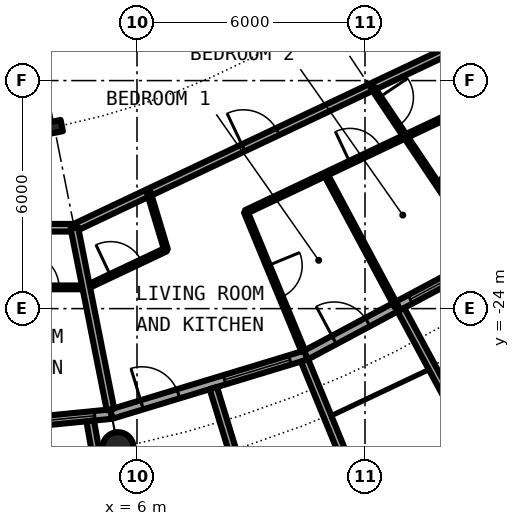
"""IFC4 building model, lengths in metres.
Left out: names, types, materials, properties, quantities, classifications, styles, units other than length and angle.
Written with IfcOpenShell. Run it as: python <this file> out.ifc"""

import sys

from ifc_helpers import new_model, si_unit, direction, frame, frame_2d, origin, origin_2d, place, context, subcontext, project, spatial, rectangle, hollow_circle, i_section, extrude, element, fill, save


model = new_model("IFC4")
c1 = context("Model", 3, precision=1e-05, world=origin(), true_north=direction((0.0, 1.0)))
c2 = subcontext(c1, "Body", "Model", "MODEL_VIEW")
j1 = project(units=[si_unit("LENGTHUNIT", "METRE"), si_unit("PLANEANGLEUNIT", "RADIAN")], contexts=[c1])
p1 = place(None, origin())
s1 = spatial("IfcSite", under=j1, at=p1, CompositionType="ELEMENT")
p2 = place(p1, origin())
s2 = spatial("IfcBuilding", under=s1, at=p2, CompositionType="ELEMENT")
p3 = place(p2, frame((0.0, 0.0, 212.7)))
s3 = spatial("IfcBuildingStorey", under=s2, at=p3, CompositionType="ELEMENT", Elevation=212.7)
p4 = place(p3, frame((5.501, -27.658, 0.0), z_axis=(0.0, 0.0, 1.0), x_axis=(1.0, 0.0, 0.0)))
e1 = element("IfcColumn", 1, at=p4, inside=s3, PredefinedType="COLUMN", context=c2, shape_type="SweptSolid", body=[
    extrude(hollow_circle(Radius=0.406, WallThickness=0.03, at=origin_2d()), origin(), (0.0, 0.0, 1.0), 3.05),
])
p5 = place(p3, frame((3.824, -19.223, 0.0), z_axis=(0.0, 0.0, 1.0), x_axis=(0.195090322016, -0.980785280403, 0.0)))
e2 = element("IfcColumn", 2, at=p5, inside=s3, PredefinedType="COLUMN", context=c2, shape_type="SweptSolid", body=[
    extrude(i_section(OverallWidth=0.3, OverallDepth=0.4, WebThickness=0.013, FlangeThickness=0.024, FilletRadius=0.027, at=origin_2d()), origin(), (0.0, 0.0, 1.0), 3.05),
])
p6 = place(p3, frame((0.0, -27.3, 0.0), z_axis=(0.0, 0.0, 1.0), x_axis=(0.995173996315, 0.098126026407, 0.0)))
e3 = element("IfcWall", 3, at=p6, inside=s3, PredefinedType="SOLIDWALL", context=c2, shape_type="SweptSolid", body=[
    extrude(rectangle(XDim=5.352, YDim=0.25, at=frame_2d((2.676, 0.0))), origin(), (0.0, 0.0, 1.0), 2.7),
])
p7 = place(p6, frame((0.841, 0.0, 0.0)))
e4 = element("IfcOpeningElement", 4, at=p7, cuts=e3, PredefinedType="OPENING", context=c2, shape_type="SweptSolid", body=[
    extrude(rectangle(XDim=1.0, YDim=2.2, at=frame_2d((0.5, 1.1))), frame((0.0, 0.135, 0.0), z_axis=(0.0, -1.0, 0.0), x_axis=(1.0, 0.0, 0.0)), (0.0, 0.0, 1.0), 0.27),
])
p8 = place(p6, frame((3.111, 0.0, 0.3)))
e5 = element("IfcOpeningElement", 5, at=p8, cuts=e3, PredefinedType="OPENING", context=c2, shape_type="SweptSolid", body=[
    extrude(rectangle(XDim=1.8, YDim=2.1, at=frame_2d((0.9, 1.05))), frame((0.0, 0.135, 0.0), z_axis=(0.0, -1.0, 0.0), x_axis=(1.0, 0.0, 0.0)), (0.0, 0.0, 1.0), 0.27),
])
p9 = place(p3, frame((4.769, -26.956, -0.03), z_axis=(0.0, 0.0, 1.0), x_axis=(0.174056778901, -0.984735618183, 0.0)))
e6 = element("IfcWall", 6, at=p9, inside=s3, PredefinedType="SOLIDWALL", context=c2, shape_type="SweptSolid", body=[
    extrude(rectangle(XDim=2.925, YDim=0.2, at=frame_2d((1.462, 0.0))), origin(), (0.0, 0.0, 1.0), 2.73),
])
p10 = place(p3, frame((5.326, -26.775, 0.0), z_axis=(0.0, 0.0, 1.0), x_axis=(0.956965678721, 0.290201119486, 0.0)))
e7 = element("IfcWall", 7, at=p10, inside=s3, PredefinedType="SOLIDWALL", context=c2, shape_type="SweptSolid", body=[
    extrude(rectangle(XDim=5.351, YDim=0.25, at=frame_2d((2.676, 0.0))), origin(), (0.0, 0.0, 1.0), 2.7),
])
p11 = place(p10, frame((0.841, 0.0, 0.0)))
e8 = element("IfcOpeningElement", 8, at=p11, cuts=e7, PredefinedType="OPENING", context=c2, shape_type="SweptSolid", body=[
    extrude(rectangle(XDim=1.0, YDim=2.2, at=frame_2d((0.5, 1.1))), frame((0.0, 0.135, 0.0), z_axis=(0.0, -1.0, 0.0), x_axis=(1.0, 0.0, 0.0)), (0.0, 0.0, 1.0), 0.27),
])
p12 = place(p10, frame((3.111, 0.0, 0.3)))
e9 = element("IfcOpeningElement", 9, at=p12, cuts=e7, PredefinedType="OPENING", context=c2, shape_type="SweptSolid", body=[
    extrude(rectangle(XDim=1.8, YDim=2.1, at=frame_2d((0.9, 1.05))), frame((0.0, 0.135, 0.0), z_axis=(0.0, -1.0, 0.0), x_axis=(1.0, 0.0, 0.0)), (0.0, 0.0, 1.0), 0.27),
])
p13 = place(p3, frame((8.009, -26.092, -0.03), z_axis=(0.0, 0.0, 1.0), x_axis=(0.293406695073, -0.955987715029, 0.0)))
e10 = element("IfcWall", 10, at=p13, inside=s3, PredefinedType="SOLIDWALL", context=c2, shape_type="SweptSolid", body=[
    extrude(rectangle(XDim=3.006, YDim=0.2, at=frame_2d((1.503, 0.0))), origin(), (0.0, 0.0, 1.0), 2.73),
])
p14 = place(p3, frame((10.409, -25.364, -0.03), z_axis=(0.0, 0.0, 1.0), x_axis=(0.379509886562, -0.925187681501, 0.0)))
e11 = element("IfcWall", 11, at=p14, inside=s3, PredefinedType="SOLIDWALL", context=c2, shape_type="SweptSolid", body=[
    extrude(rectangle(XDim=2.883, YDim=0.2, at=frame_2d((1.441, 0.0))), origin(), (0.0, 0.0, 1.0), 2.73),
])
p15 = place(p3, frame((10.447, -25.222, 0.0), z_axis=(0.0, 0.0, 1.0), x_axis=(0.881915646801, 0.471407246368, 0.0)))
e12 = element("IfcWall", 12, at=p15, inside=s3, PredefinedType="SOLIDWALL", context=c2, shape_type="SweptSolid", body=[
    extrude(rectangle(XDim=5.352, YDim=0.25, at=frame_2d((2.676, 0.0))), origin(), (0.0, 0.0, 1.0), 2.7),
])
p16 = place(p15, frame((0.841, 0.0, 0.0)))
e13 = element("IfcOpeningElement", 13, at=p16, cuts=e12, PredefinedType="OPENING", context=c2, shape_type="SweptSolid", body=[
    extrude(rectangle(XDim=1.0, YDim=2.2, at=frame_2d((0.5, 1.1))), frame((0.0, 0.135, 0.0), z_axis=(0.0, -1.0, 0.0), x_axis=(1.0, 0.0, 0.0)), (0.0, 0.0, 1.0), 0.27),
])
p17 = place(p15, frame((3.111, 0.0, 0.3)))
e14 = element("IfcOpeningElement", 14, at=p17, cuts=e12, PredefinedType="OPENING", context=c2, shape_type="SweptSolid", body=[
    extrude(rectangle(XDim=1.8, YDim=2.1, at=frame_2d((0.9, 1.05))), frame((0.0, 0.135, 0.0), z_axis=(0.0, -1.0, 0.0), x_axis=(1.0, 0.0, 0.0)), (0.0, 0.0, 1.0), 0.27),
])
p18 = place(p3, frame((12.945, -24.029, -0.03), z_axis=(0.0, 0.0, 1.0), x_axis=(0.474424310775, -0.88029629861, 0.0)))
e15 = element("IfcWall", 15, at=p18, inside=s3, PredefinedType="SOLIDWALL", context=c2, shape_type="SweptSolid", body=[
    extrude(rectangle(XDim=3.006, YDim=0.2, at=frame_2d((1.503, 0.0))), origin(), (0.0, 0.0, 1.0), 2.73),
])
p19 = place(p3, frame((2.331, -23.441, 0.0), z_axis=(0.0, 0.0, 1.0), x_axis=(1.0, 0.0, 0.0)))
e16 = element("IfcWall", 16, at=p19, inside=s3, PredefinedType="PARTITIONING", context=c2, shape_type="SweptSolid", body=[
    extrude(rectangle(XDim=2.332, YDim=0.1, at=frame_2d((1.166, 0.0))), origin(), (0.0, 0.0, 1.0), 2.7),
])
p20 = place(p19, frame((0.716, 0.0, 0.0)))
e17 = element("IfcOpeningElement", 17, at=p20, cuts=e16, PredefinedType="OPENING", context=c2, shape_type="SweptSolid", body=[
    extrude(rectangle(XDim=0.9, YDim=2.3, at=frame_2d((0.45, 1.15))), frame((0.0, 0.06, 0.0), z_axis=(0.0, -1.0, 0.0), x_axis=(1.0, 0.0, 0.0)), (0.0, 0.0, 1.0), 0.12),
])
p21 = place(p3, frame((4.663, -23.441, 0.0), z_axis=(0.0, 0.0, 1.0), x_axis=(0.904028696625, 0.427471771791, 0.0)))
e18 = element("IfcWall", 18, at=p21, inside=s3, PredefinedType="PARTITIONING", context=c2, shape_type="SweptSolid", body=[
    extrude(rectangle(XDim=2.323, YDim=0.1, at=frame_2d((1.161, 0.0))), origin(), (0.0, 0.0, 1.0), 2.7),
])
p22 = place(p21, frame((0.711, 0.0, 0.0)))
e19 = element("IfcOpeningElement", 19, at=p22, cuts=e18, PredefinedType="OPENING", context=c2, shape_type="SweptSolid", body=[
    extrude(rectangle(XDim=0.9, YDim=2.3, at=frame_2d((0.45, 1.15))), frame((0.0, 0.06, 0.0), z_axis=(0.0, -1.0, 0.0), x_axis=(1.0, 0.0, 0.0)), (0.0, 0.0, 1.0), 0.12),
])
p23 = place(p3, frame((8.863, -21.455, 0.0), z_axis=(0.0, 0.0, 1.0), x_axis=(0.904027961542, 0.427473326361, 0.0)))
e20 = element("IfcWall", 20, at=p23, inside=s3, PredefinedType="PARTITIONING", context=c2, shape_type="SweptSolid", body=[
    extrude(rectangle(XDim=6.969, YDim=0.1, at=frame_2d((3.484, 0.0))), origin(), (0.0, 0.0, 1.0), 2.7),
])
p24 = place(p23, frame((3.034, 0.0, 0.0)))
e21 = element("IfcOpeningElement", 21, at=p24, cuts=e20, PredefinedType="OPENING", context=c2, shape_type="SweptSolid", body=[
    extrude(rectangle(XDim=0.9, YDim=2.3, at=frame_2d((0.45, 1.15))), frame((0.0, 0.06, 0.0), z_axis=(0.0, -1.0, 0.0), x_axis=(1.0, 0.0, 0.0)), (0.0, 0.0, 1.0), 0.12),
])
p25 = place(p3, frame((-4.351, -21.872, 0.0), z_axis=(0.0, 0.0, 1.0), x_axis=(1.0, 0.0, 0.0)))
e22 = element("IfcWall", 22, at=p25, inside=s3, PredefinedType="PARTITIONING", context=c2, shape_type="SweptSolid", body=[
    extrude(rectangle(XDim=8.702, YDim=0.2, at=frame_2d((4.351, 0.0))), origin(), (0.0, 0.0, 1.0), 2.7),
])
p26 = place(p25, frame((2.763, 0.0, 0.0)))
e23 = element("IfcOpeningElement", 23, at=p26, cuts=e22, PredefinedType="OPENING", context=c2, shape_type="SweptSolid", body=[
    extrude(rectangle(XDim=1.0, YDim=2.3, at=frame_2d((0.5, 1.15))), frame((0.0, 0.11, 0.0), z_axis=(0.0, -1.0, 0.0), x_axis=(1.0, 0.0, 0.0)), (0.0, 0.0, 1.0), 0.22),
])
p27 = place(p3, frame((4.352, -21.873, 0.0), z_axis=(0.0, 0.0, 1.0), x_axis=(0.903903349022, 0.427736759733, 0.0)))
e24 = element("IfcWall", 24, at=p27, inside=s3, PredefinedType="PARTITIONING", context=c2, shape_type="SweptSolid", body=[
    extrude(rectangle(XDim=10.838, YDim=0.2, at=frame_2d((5.419, 0.0))), origin(), (0.0, 0.0, 1.0), 2.7),
])
p28 = place(p27, frame((4.92, 0.0, 0.0)))
e25 = element("IfcOpeningElement", 25, at=p28, cuts=e24, PredefinedType="OPENING", context=c2, shape_type="SweptSolid", body=[
    extrude(rectangle(XDim=1.0, YDim=2.3, at=frame_2d((0.5, 1.15))), frame((0.0, 0.11, 0.0), z_axis=(0.0, -1.0, 0.0), x_axis=(1.0, 0.0, 0.0)), (0.0, 0.0, 1.0), 0.22),
])
p29 = place(p3, frame((-3.454, -17.36, 0.0), z_axis=(0.0, 0.0, 1.0), x_axis=(0.995189328429, 0.097970406658, 0.0)))
e26 = element("IfcWall", 26, at=p29, inside=s3, PredefinedType="PARTITIONING", context=c2, shape_type="SweptSolid", body=[
    extrude(rectangle(XDim=10.28, YDim=0.2, at=frame_2d((5.14, 0.0))), origin(), (0.0, 0.0, 1.0), 2.7),
])
p30 = place(p29, frame((4.639, 0.0, 0.0)))
e27 = element("IfcOpeningElement", 27, at=p30, cuts=e26, PredefinedType="OPENING", context=c2, shape_type="SweptSolid", body=[
    extrude(rectangle(XDim=1.0, YDim=2.3, at=frame_2d((0.5, 1.15))), frame((0.0, 0.11, 0.0), z_axis=(0.0, -1.0, 0.0), x_axis=(1.0, 0.0, 0.0)), (0.0, 0.0, 1.0), 0.22),
])
p31 = place(p3, frame((4.351, -21.872, 0.0), z_axis=(0.0, 0.0, 1.0), x_axis=(0.195075825861, -0.980788163756, 0.0)))
e28 = element("IfcWall", 28, at=p31, inside=s3, PredefinedType="PARTITIONING", context=c2, shape_type="SweptSolid", body=[
    extrude(rectangle(XDim=4.875, YDim=0.2, at=frame_2d((2.438, 0.0))), origin(), (0.0, 0.0, 1.0), 2.7),
])
p32 = place(p3, frame((6.31, -20.945, 0.0), z_axis=(0.0, 0.0, 1.0), x_axis=(0.288517752304, -0.957474546192, 0.0)))
e29 = element("IfcWall", 29, at=p32, inside=s3, PredefinedType="PARTITIONING", context=c2, shape_type="SweptSolid", body=[
    extrude(rectangle(XDim=1.57, YDim=0.1, at=frame_2d((0.785, 0.0))), origin(), (0.0, 0.0, 1.0), 2.7),
])
p33 = place(p3, frame((8.862, -21.454, 0.0), z_axis=(0.0, 0.0, 1.0), x_axis=(0.381852842178, -0.924223136975, 0.0)))
e30 = element("IfcWall", 30, at=p33, inside=s3, PredefinedType="PARTITIONING", context=c2, shape_type="SweptSolid", body=[
    extrude(rectangle(XDim=3.962, YDim=0.1, at=frame_2d((1.981, 0.0))), origin(), (0.0, 0.0, 1.0), 2.7),
])
p34 = place(p33, frame((1.531, 0.0, 0.0)))
e31 = element("IfcOpeningElement", 31, at=p34, cuts=e30, PredefinedType="OPENING", context=c2, shape_type="SweptSolid", body=[
    extrude(rectangle(XDim=0.9, YDim=2.3, at=frame_2d((0.45, 1.15))), frame((0.0, 0.06, 0.0), z_axis=(0.0, -1.0, 0.0), x_axis=(1.0, 0.0, 0.0)), (0.0, 0.0, 1.0), 0.12),
])
p35 = place(p3, frame((10.962, -20.461, 0.0), z_axis=(0.0, 0.0, 1.0), x_axis=(0.472173540979, -0.881505613822, 0.0)))
e32 = element("IfcWall", 32, at=p35, inside=s3, PredefinedType="PARTITIONING", context=c2, shape_type="SweptSolid", body=[
    extrude(rectangle(XDim=3.963, YDim=0.1, at=frame_2d((1.981, 0.0))), origin(), (0.0, 0.0, 1.0), 2.7),
])
p36 = place(p3, frame((12.188, -18.165, 0.0), z_axis=(0.0, 0.0, 1.0), x_axis=(0.557206464517, -0.830373985564, 0.0)))
e33 = element("IfcWall", 33, at=p36, inside=s3, PredefinedType="PARTITIONING", context=c2, shape_type="SweptSolid", body=[
    extrude(rectangle(XDim=5.3, YDim=0.1, at=frame_2d((2.65, 0.0))), origin(), (0.0, 0.0, 1.0), 2.7),
])
p37 = place(p36, frame((0.334, 0.0, 0.0)))
e34 = element("IfcOpeningElement", 34, at=p37, cuts=e33, PredefinedType="OPENING", context=c2, shape_type="SweptSolid", body=[
    extrude(rectangle(XDim=0.9, YDim=2.3, at=frame_2d((0.45, 1.15))), frame((0.0, 0.06, 0.0), z_axis=(0.0, -1.0, 0.0), x_axis=(1.0, 0.0, 0.0)), (0.0, 0.0, 1.0), 0.12),
])
p38 = place(p36, frame((2.984, 0.0, 0.0)))
e35 = element("IfcOpeningElement", 35, at=p38, cuts=e33, PredefinedType="OPENING", context=c2, shape_type="SweptSolid", body=[
    extrude(rectangle(XDim=0.9, YDim=2.3, at=frame_2d((0.45, 1.15))), frame((0.0, 0.06, 0.0), z_axis=(0.0, -1.0, 0.0), x_axis=(1.0, 0.0, 0.0)), (0.0, 0.0, 1.0), 0.12),
])
p39 = place(p8, origin())
e36 = element("IfcWindow", 36, at=p39, inside=s3, PartitioningType="SINGLE_PANEL", PredefinedType="WINDOW", context=c2, shape_type="SweptSolid", body=[
    extrude(rectangle(XDim=1.8, YDim=2.1, at=frame_2d((0.9, 1.05))), frame((0.0, 0.03, 0.0), z_axis=(0.0, -1.0, 0.0), x_axis=(1.0, 0.0, 0.0)), (0.0, 0.0, 1.0), 0.06),
])
fill(e5, e36)
p40 = place(p11, origin())
e37 = element("IfcDoor", 37, at=p40, inside=s3, OperationType="SINGLE_SWING_LEFT", PredefinedType="DOOR", context=c2, shape_type="SweptSolid", body=[
    extrude(rectangle(XDim=1.0, YDim=2.2, at=frame_2d((0.5, 1.1))), frame((0.0, 0.025, 0.0), z_axis=(0.0, -1.0, 0.0), x_axis=(1.0, 0.0, 0.0)), (0.0, 0.0, 1.0), 0.05),
])
fill(e8, e37)
p41 = place(p12, origin())
e38 = element("IfcWindow", 38, at=p41, inside=s3, PartitioningType="SINGLE_PANEL", PredefinedType="WINDOW", context=c2, shape_type="SweptSolid", body=[
    extrude(rectangle(XDim=1.8, YDim=2.1, at=frame_2d((0.9, 1.05))), frame((0.0, 0.03, 0.0), z_axis=(0.0, -1.0, 0.0), x_axis=(1.0, 0.0, 0.0)), (0.0, 0.0, 1.0), 0.06),
])
fill(e9, e38)
p42 = place(p16, origin())
e39 = element("IfcDoor", 39, at=p42, inside=s3, OperationType="SINGLE_SWING_LEFT", PredefinedType="DOOR", context=c2, shape_type="SweptSolid", body=[
    extrude(rectangle(XDim=1.0, YDim=2.2, at=frame_2d((0.5, 1.1))), frame((0.0, 0.025, 0.0), z_axis=(0.0, -1.0, 0.0), x_axis=(1.0, 0.0, 0.0)), (0.0, 0.0, 1.0), 0.05),
])
fill(e13, e39)
p43 = place(p17, origin())
e40 = element("IfcWindow", 40, at=p43, inside=s3, PartitioningType="SINGLE_PANEL", PredefinedType="WINDOW", context=c2, shape_type="SweptSolid", body=[
    extrude(rectangle(XDim=1.8, YDim=2.1, at=frame_2d((0.9, 1.05))), frame((0.0, 0.03, 0.0), z_axis=(0.0, -1.0, 0.0), x_axis=(1.0, 0.0, 0.0)), (0.0, 0.0, 1.0), 0.06),
])
fill(e14, e40)
p44 = place(p20, origin())
e41 = element("IfcDoor", 41, at=p44, inside=s3, OperationType="SINGLE_SWING_LEFT", PredefinedType="DOOR", context=c2, shape_type="SweptSolid", body=[
    extrude(rectangle(XDim=0.9, YDim=2.3, at=frame_2d((0.45, 1.15))), frame((0.0, 0.025, 0.0), z_axis=(0.0, -1.0, 0.0), x_axis=(1.0, 0.0, 0.0)), (0.0, 0.0, 1.0), 0.05),
])
fill(e17, e41)
p45 = place(p28, origin())
e42 = element("IfcDoor", 42, at=p45, inside=s3, OperationType="SINGLE_SWING_RIGHT", PredefinedType="DOOR", context=c2, shape_type="SweptSolid", body=[
    extrude(rectangle(XDim=1.0, YDim=2.3, at=frame_2d((0.5, 1.15))), frame((0.0, 0.025, 0.0), z_axis=(0.0, -1.0, 0.0), x_axis=(1.0, 0.0, 0.0)), (0.0, 0.0, 1.0), 0.05),
])
fill(e25, e42)
p46 = place(p22, origin())
e43 = element("IfcDoor", 43, at=p46, inside=s3, OperationType="SINGLE_SWING_LEFT", PredefinedType="DOOR", context=c2, shape_type="SweptSolid", body=[
    extrude(rectangle(XDim=0.9, YDim=2.3, at=frame_2d((0.45, 1.15))), frame((0.0, 0.025, 0.0), z_axis=(0.0, -1.0, 0.0), x_axis=(1.0, 0.0, 0.0)), (0.0, 0.0, 1.0), 0.05),
])
fill(e19, e43)
p47 = place(p37, origin())
e44 = element("IfcDoor", 44, at=p47, inside=s3, OperationType="SINGLE_SWING_LEFT", PredefinedType="DOOR", context=c2, shape_type="SweptSolid", body=[
    extrude(rectangle(XDim=0.9, YDim=2.3, at=frame_2d((0.45, 1.15))), frame((0.0, 0.025, 0.0), z_axis=(0.0, -1.0, 0.0), x_axis=(1.0, 0.0, 0.0)), (0.0, 0.0, 1.0), 0.05),
])
fill(e34, e44)
p48 = place(p34, origin())
e45 = element("IfcDoor", 45, at=p48, inside=s3, OperationType="SINGLE_SWING_LEFT", PredefinedType="DOOR", context=c2, shape_type="SweptSolid", body=[
    extrude(rectangle(XDim=0.9, YDim=2.3, at=frame_2d((0.45, 1.15))), frame((0.0, 0.025, 0.0), z_axis=(0.0, -1.0, 0.0), x_axis=(1.0, 0.0, 0.0)), (0.0, 0.0, 1.0), 0.05),
])
fill(e31, e45)
p49 = place(p24, origin())
e46 = element("IfcDoor", 46, at=p49, inside=s3, OperationType="SINGLE_SWING_LEFT", PredefinedType="DOOR", context=c2, shape_type="SweptSolid", body=[
    extrude(rectangle(XDim=0.9, YDim=2.3, at=frame_2d((0.45, 1.15))), frame((0.0, 0.025, 0.0), z_axis=(0.0, -1.0, 0.0), x_axis=(1.0, 0.0, 0.0)), (0.0, 0.0, 1.0), 0.05),
])
fill(e21, e46)
p50 = place(p38, origin())
e47 = element("IfcDoor", 47, at=p50, inside=s3, OperationType="SINGLE_SWING_RIGHT", PredefinedType="DOOR", context=c2, shape_type="SweptSolid", body=[
    extrude(rectangle(XDim=0.9, YDim=2.3, at=frame_2d((0.45, 1.15))), frame((0.0, 0.025, 0.0), z_axis=(0.0, -1.0, 0.0), x_axis=(1.0, 0.0, 0.0)), (0.0, 0.0, 1.0), 0.05),
])
fill(e35, e47)
save(model, sys.argv[1])
